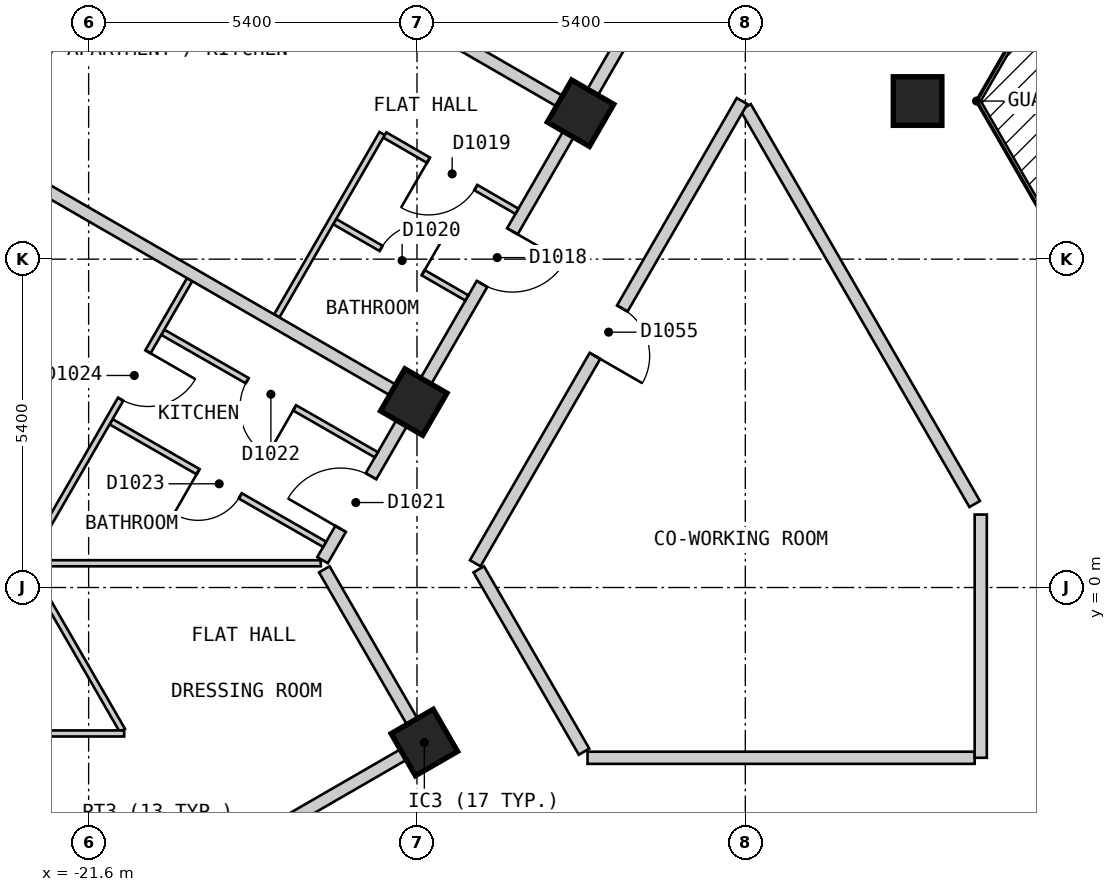
"""IFC4 building model, lengths in metres.
Left out: names, types, materials, properties, quantities, classifications, styles, units other than length and angle.
Written with IfcOpenShell. Run it as: python <this file> out.ifc"""

import sys

from ifc_helpers import new_model, si_unit, direction, frame, frame_2d, origin, origin_2d, place, context, subcontext, project, spatial, polyline, rectangle, outline, extrude, element, fill, save


model = new_model("IFC4")
c1 = context("Model", 3, precision=1e-05, world=origin(), true_north=direction((0.0, 1.0)))
c2 = subcontext(c1, "Body", "Model", "MODEL_VIEW")
j1 = project(units=[si_unit("LENGTHUNIT", "METRE"), si_unit("PLANEANGLEUNIT", "RADIAN")], contexts=[c1])
p1 = place(None, origin())
s1 = spatial("IfcSite", under=j1, at=p1, CompositionType="ELEMENT")
p2 = place(p1, origin())
s2 = spatial("IfcBuilding", under=s1, at=p2, CompositionType="ELEMENT")
p3 = place(p2, frame((0.0, 0.0, 126.6)))
s3 = spatial("IfcBuildingStorey", under=s2, at=p3, CompositionType="ELEMENT", Elevation=126.6)
for number, where, z_axis, x_axis in (
    (1, (-16.079, -2.549, 0.0), (0.0, 0.0, 1.0), (0.5, -0.866, 0.0)),
    (2, (-7.967, 8.0, 0.0), (0.0, 0.0, 1.0), (1.0, 0.0, 0.0)),
    (3, (-13.51, 7.8, 0.0), (0.0, 0.0, 1.0), (-0.5, -0.866, 0.0)),
    (4, (-16.253, 3.05, 0.0), (0.0, 0.0, 1.0), (-0.5, -0.866, 0.0)),
):
    element("IfcColumn", number, at=place(p3, frame(where, z_axis=z_axis, x_axis=x_axis)), inside=s3, PredefinedType="COLUMN", context=c2, shape_type="SweptSolid", body=[
        extrude(rectangle(XDim=0.8, YDim=0.8, at=origin_2d()), origin(), (0.0, 0.0, 1.0), 3.0),
    ])
p4 = place(p3, frame((-16.555, 23.025, 0.0), z_axis=(0.0, 0.0, 1.0), x_axis=(-0.500020536353, -0.866013546791, 0.0)))
e5 = element("IfcWall", 5, at=p4, inside=s3, PredefinedType="SOLIDWALL", context=c2, shape_type="SweptSolid", body=[
    extrude(outline(polyline([(0.0, -0.15), (23.325, -0.15), (23.245, 0.15), (0.08, 0.15), (0.0, -0.15)])), origin(), (0.0, 0.0, 1.0), 2.7),
])
p5 = place(p4, frame((1.314, 0.0, 0.15)))
e6 = element("IfcOpeningElement", 6, at=p5, cuts=e5, PredefinedType="OPENING", context=c2, shape_type="SweptSolid", body=[
    extrude(rectangle(XDim=1.5, YDim=2.1, at=frame_2d((0.75, 1.05))), frame((0.0, 0.16, 0.0), z_axis=(0.0, -1.0, 0.0), x_axis=(1.0, 0.0, 0.0)), (0.0, 0.0, 1.0), 0.32),
])
p6 = place(p4, frame((4.056, 0.0, 0.15)))
e7 = element("IfcOpeningElement", 7, at=p6, cuts=e5, PredefinedType="OPENING", context=c2, shape_type="SweptSolid", body=[
    extrude(rectangle(XDim=1.5, YDim=2.1, at=frame_2d((0.75, 1.05))), frame((0.0, 0.16, 0.0), z_axis=(0.0, -1.0, 0.0), x_axis=(1.0, 0.0, 0.0)), (0.0, 0.0, 1.0), 0.32),
])
p7 = place(p4, frame((6.799, 0.0, 0.15)))
e8 = element("IfcOpeningElement", 8, at=p7, cuts=e5, PredefinedType="OPENING", context=c2, shape_type="SweptSolid", body=[
    extrude(rectangle(XDim=1.5, YDim=2.1, at=frame_2d((0.75, 1.05))), frame((0.0, 0.16, 0.0), z_axis=(0.0, -1.0, 0.0), x_axis=(1.0, 0.0, 0.0)), (0.0, 0.0, 1.0), 0.32),
])
p8 = place(p4, frame((9.541, 0.0, 0.15)))
e9 = element("IfcOpeningElement", 9, at=p8, cuts=e5, PredefinedType="OPENING", context=c2, shape_type="SweptSolid", body=[
    extrude(rectangle(XDim=1.5, YDim=2.1, at=frame_2d((0.75, 1.05))), frame((0.0, 0.16, 0.0), z_axis=(0.0, -1.0, 0.0), x_axis=(1.0, 0.0, 0.0)), (0.0, 0.0, 1.0), 0.32),
])
p9 = place(p4, frame((12.285, 0.0, 0.15)))
e10 = element("IfcOpeningElement", 10, at=p9, cuts=e5, PredefinedType="OPENING", context=c2, shape_type="SweptSolid", body=[
    extrude(rectangle(XDim=1.5, YDim=2.1, at=frame_2d((0.75, 1.05))), frame((0.0, 0.16, 0.0), z_axis=(0.0, -1.0, 0.0), x_axis=(1.0, 0.0, 0.0)), (0.0, 0.0, 1.0), 0.32),
])
p10 = place(p4, frame((15.027, 0.0, 0.15)))
e11 = element("IfcOpeningElement", 11, at=p10, cuts=e5, PredefinedType="OPENING", context=c2, shape_type="SweptSolid", body=[
    extrude(rectangle(XDim=1.5, YDim=2.1, at=frame_2d((0.75, 1.05))), frame((0.0, 0.16, 0.0), z_axis=(0.0, -1.0, 0.0), x_axis=(1.0, 0.0, 0.0)), (0.0, 0.0, 1.0), 0.32),
])
p11 = place(p4, frame((17.769, 0.0, 0.15)))
e12 = element("IfcOpeningElement", 12, at=p11, cuts=e5, PredefinedType="OPENING", context=c2, shape_type="SweptSolid", body=[
    extrude(rectangle(XDim=1.5, YDim=2.1, at=frame_2d((0.75, 1.05))), frame((0.0, 0.16, 0.0), z_axis=(0.0, -1.0, 0.0), x_axis=(1.0, 0.0, 0.0)), (0.0, 0.0, 1.0), 0.32),
])
p12 = place(p4, frame((20.512, 0.0, 0.15)))
e13 = element("IfcOpeningElement", 13, at=p12, cuts=e5, PredefinedType="OPENING", context=c2, shape_type="SweptSolid", body=[
    extrude(rectangle(XDim=1.5, YDim=2.1, at=frame_2d((0.75, 1.05))), frame((0.0, 0.16, 0.0), z_axis=(0.0, -1.0, 0.0), x_axis=(1.0, 0.0, 0.0)), (0.0, 0.0, 1.0), 0.32),
])
p13 = place(p3, frame((-28.218, -2.025, 0.0), z_axis=(0.0, 0.0, 1.0), x_axis=(0.500017503135, -0.866015298109, 0.0)))
e14 = element("IfcWall", 14, at=p13, inside=s3, PredefinedType="SOLIDWALL", context=c2, shape_type="SweptSolid", body=[
    extrude(outline(polyline([(0.0, -0.15), (24.711, -0.15), (24.631, 0.15), (0.08, 0.15), (0.0, -0.15)])), origin(), (0.0, 0.0, 1.0), 2.7),
])
p14 = place(p13, frame((1.4, 0.0, 0.15)))
e15 = element("IfcOpeningElement", 15, at=p14, cuts=e14, PredefinedType="OPENING", context=c2, shape_type="SweptSolid", body=[
    extrude(rectangle(XDim=1.5, YDim=2.1, at=frame_2d((0.75, 1.05))), frame((0.0, 0.16, 0.0), z_axis=(0.0, -1.0, 0.0), x_axis=(1.0, 0.0, 0.0)), (0.0, 0.0, 1.0), 0.32),
])
p15 = place(p13, frame((4.316, 0.0, 0.15)))
e16 = element("IfcOpeningElement", 16, at=p15, cuts=e14, PredefinedType="OPENING", context=c2, shape_type="SweptSolid", body=[
    extrude(rectangle(XDim=1.5, YDim=2.1, at=frame_2d((0.75, 1.05))), frame((0.0, 0.16, 0.0), z_axis=(0.0, -1.0, 0.0), x_axis=(1.0, 0.0, 0.0)), (0.0, 0.0, 1.0), 0.32),
])
p16 = place(p13, frame((7.231, 0.0, 0.15)))
e17 = element("IfcOpeningElement", 17, at=p16, cuts=e14, PredefinedType="OPENING", context=c2, shape_type="SweptSolid", body=[
    extrude(rectangle(XDim=1.5, YDim=2.1, at=frame_2d((0.75, 1.05))), frame((0.0, 0.16, 0.0), z_axis=(0.0, -1.0, 0.0), x_axis=(1.0, 0.0, 0.0)), (0.0, 0.0, 1.0), 0.32),
])
p17 = place(p13, frame((10.147, 0.0, 0.15)))
e18 = element("IfcOpeningElement", 18, at=p17, cuts=e14, PredefinedType="OPENING", context=c2, shape_type="SweptSolid", body=[
    extrude(rectangle(XDim=1.5, YDim=2.1, at=frame_2d((0.75, 1.05))), frame((0.0, 0.16, 0.0), z_axis=(0.0, -1.0, 0.0), x_axis=(1.0, 0.0, 0.0)), (0.0, 0.0, 1.0), 0.32),
])
p18 = place(p13, frame((13.062, 0.0, 0.15)))
e19 = element("IfcOpeningElement", 19, at=p18, cuts=e14, PredefinedType="OPENING", context=c2, shape_type="SweptSolid", body=[
    extrude(rectangle(XDim=1.5, YDim=2.1, at=frame_2d((0.75, 1.05))), frame((0.0, 0.16, 0.0), z_axis=(0.0, -1.0, 0.0), x_axis=(1.0, 0.0, 0.0)), (0.0, 0.0, 1.0), 0.32),
])
p19 = place(p13, frame((15.977, 0.0, 0.15)))
e20 = element("IfcOpeningElement", 20, at=p19, cuts=e14, PredefinedType="OPENING", context=c2, shape_type="SweptSolid", body=[
    extrude(rectangle(XDim=1.5, YDim=2.1, at=frame_2d((0.75, 1.05))), frame((0.0, 0.16, 0.0), z_axis=(0.0, -1.0, 0.0), x_axis=(1.0, 0.0, 0.0)), (0.0, 0.0, 1.0), 0.32),
])
p20 = place(p13, frame((18.893, 0.0, 0.15)))
e21 = element("IfcOpeningElement", 21, at=p20, cuts=e14, PredefinedType="OPENING", context=c2, shape_type="SweptSolid", body=[
    extrude(rectangle(XDim=1.5, YDim=2.1, at=frame_2d((0.75, 1.05))), frame((0.0, 0.16, 0.0), z_axis=(0.0, -1.0, 0.0), x_axis=(1.0, 0.0, 0.0)), (0.0, 0.0, 1.0), 0.32),
])
p21 = place(p13, frame((21.809, 0.0, 0.15)))
e22 = element("IfcOpeningElement", 22, at=p21, cuts=e14, PredefinedType="OPENING", context=c2, shape_type="SweptSolid", body=[
    extrude(rectangle(XDim=1.5, YDim=2.1, at=frame_2d((0.75, 1.05))), frame((0.0, 0.16, 0.0), z_axis=(0.0, -1.0, 0.0), x_axis=(1.0, 0.0, 0.0)), (0.0, 0.0, 1.0), 0.32),
])
p22 = place(p3, frame((-10.796, 7.9, 0.0), z_axis=(0.0, 0.0, 1.0), x_axis=(0.499954271211, -0.866051803703, 0.0)))
e23 = element("IfcWall", 23, at=p22, inside=s3, PredefinedType="PARTITIONING", context=c2, shape_type="SweptSolid", body=[
    extrude(rectangle(XDim=7.536, YDim=0.2, at=frame_2d((3.768, 0.0))), origin(), (0.0, 0.0, 1.0), 2.7),
])
p23 = place(p3, frame((-15.184, 0.299, 0.0), z_axis=(0.0, 0.0, 1.0), x_axis=(0.500149577091, -0.865939028186, 0.0)))
e24 = element("IfcWall", 24, at=p23, inside=s3, PredefinedType="PARTITIONING", context=c2, shape_type="SweptSolid", body=[
    extrude(rectangle(XDim=3.463, YDim=0.2, at=frame_2d((1.732, 0.0))), origin(), (0.0, 0.0, 1.0), 2.7),
])
p24 = place(p3, frame((-17.724, 0.299, 0.0), z_axis=(0.0, 0.0, 1.0), x_axis=(0.499910220442, -0.866077231832, 0.0)))
e25 = element("IfcWall", 25, at=p24, inside=s3, PredefinedType="PARTITIONING", context=c2, shape_type="SweptSolid", body=[
    extrude(rectangle(XDim=3.189, YDim=0.2, at=frame_2d((1.594, 0.0))), origin(), (0.0, 0.0, 1.0), 2.7),
])
p25 = place(p3, frame((-13.395, -2.8, 0.0), z_axis=(0.0, 0.0, 1.0), x_axis=(1.0, 0.0, 0.0)))
e26 = element("IfcWall", 26, at=p25, inside=s3, PredefinedType="PARTITIONING", context=c2, shape_type="SweptSolid", body=[
    extrude(rectangle(XDim=6.367, YDim=0.2, at=frame_2d((3.184, 0.0))), origin(), (0.0, 0.0, 1.0), 2.7),
])
p26 = place(p3, frame((-15.242, 0.399, 0.0), z_axis=(0.0, 0.0, 1.0), x_axis=(0.499953615651, 0.866052182145, 0.0)))
e27 = element("IfcWall", 27, at=p26, inside=s3, PredefinedType="PARTITIONING", context=c2, shape_type="SweptSolid", body=[
    extrude(rectangle(XDim=8.777, YDim=0.2, at=frame_2d((4.388, 0.0))), origin(), (0.0, 0.0, 1.0), 2.7),
])
p27 = place(p26, frame((3.938, 0.0, 0.0)))
e28 = element("IfcOpeningElement", 28, at=p27, cuts=e27, PredefinedType="OPENING", context=c2, shape_type="SweptSolid", body=[
    extrude(rectangle(XDim=0.9, YDim=2.1, at=frame_2d((0.45, 1.05))), frame((0.0, 0.11, 0.0), z_axis=(0.0, -1.0, 0.0), x_axis=(1.0, 0.0, 0.0)), (0.0, 0.0, 1.0), 0.22),
])
p28 = place(p3, frame((-17.753, 0.45, 0.0), z_axis=(0.0, 0.0, 1.0), x_axis=(0.499990970252, 0.866030617049, 0.0)))
e29 = element("IfcWall", 29, at=p28, inside=s3, PredefinedType="PARTITIONING", context=c2, shape_type="SweptSolid", body=[
    extrude(rectangle(XDim=16.974, YDim=0.2, at=frame_2d((8.487, 0.0))), origin(), (0.0, 0.0, 1.0), 2.7),
])
p29 = place(p28, frame((10.73, 0.0, 0.0)))
e30 = element("IfcOpeningElement", 30, at=p29, cuts=e29, PredefinedType="OPENING", context=c2, shape_type="SweptSolid", body=[
    extrude(rectangle(XDim=1.0, YDim=2.1, at=frame_2d((0.5, 1.05))), frame((0.0, 0.11, 0.0), z_axis=(0.0, -1.0, 0.0), x_axis=(1.0, 0.0, 0.0)), (0.0, 0.0, 1.0), 0.22),
])
p30 = place(p28, frame((5.245, 0.0, 0.0)))
e31 = element("IfcOpeningElement", 31, at=p30, cuts=e29, PredefinedType="OPENING", context=c2, shape_type="SweptSolid", body=[
    extrude(rectangle(XDim=1.0, YDim=2.1, at=frame_2d((0.5, 1.05))), frame((0.0, 0.11, 0.0), z_axis=(0.0, -1.0, 0.0), x_axis=(1.0, 0.0, 0.0)), (0.0, 0.0, 1.0), 0.22),
])
p31 = place(p28, frame((0.594, 0.0, 0.0)))
e32 = element("IfcOpeningElement", 32, at=p31, cuts=e29, PredefinedType="OPENING", context=c2, shape_type="SweptSolid", body=[
    extrude(rectangle(XDim=1.0, YDim=2.1, at=frame_2d((0.5, 1.05))), frame((0.0, 0.11, 0.0), z_axis=(0.0, -1.0, 0.0), x_axis=(1.0, 0.0, 0.0)), (0.0, 0.0, 1.0), 0.22),
])
p32 = place(p3, frame((-6.928, -2.8, 0.0), z_axis=(0.0, 0.0, 1.0), x_axis=(0.0, 1.0, 0.0)))
e33 = element("IfcWall", 33, at=p32, inside=s3, PredefinedType="PARTITIONING", context=c2, shape_type="SweptSolid", body=[
    extrude(rectangle(XDim=4.0, YDim=0.2, at=frame_2d((2.0, 0.0))), origin(), (0.0, 0.0, 1.0), 2.7),
])
p33 = place(p3, frame((-22.603, 0.349, 0.0), z_axis=(0.0, 0.0, 1.0), x_axis=(0.499930403552, -0.866065581584, 0.0)))
e34 = element("IfcWall", 34, at=p33, inside=s3, PredefinedType="PARTITIONING", context=c2, shape_type="SweptSolid", body=[
    extrude(rectangle(XDim=3.117, YDim=0.1, at=frame_2d((1.558, 0.0))), origin(), (0.0, 0.0, 1.0), 2.7),
])
p34 = place(p3, frame((-17.553, 6.017, 0.0), z_axis=(0.0, 0.0, 1.0), x_axis=(0.866038211682, -0.499977815414, 0.0)))
e35 = element("IfcWall", 35, at=p34, inside=s3, PredefinedType="PARTITIONING", context=c2, shape_type="SweptSolid", body=[
    extrude(rectangle(XDim=2.51, YDim=0.1, at=frame_2d((1.255, 0.0))), origin(), (0.0, 0.0, 1.0), 2.7),
])
p35 = place(p34, frame((0.88, 0.0, 0.0)))
e36 = element("IfcOpeningElement", 36, at=p35, cuts=e35, PredefinedType="OPENING", context=c2, shape_type="SweptSolid", body=[
    extrude(rectangle(XDim=0.8, YDim=2.1, at=frame_2d((0.4, 1.05))), frame((0.0, 0.06, 0.0), z_axis=(0.0, -1.0, 0.0), x_axis=(1.0, 0.0, 0.0)), (0.0, 0.0, 1.0), 0.12),
])
p36 = place(p3, frame((-20.381, 4.198, 0.0), z_axis=(0.0, 0.0, 1.0), x_axis=(0.867459321792, -0.497508115549, 0.0)))
e37 = element("IfcWall", 37, at=p36, inside=s3, PredefinedType="PARTITIONING", context=c2, shape_type="SweptSolid", body=[
    extrude(rectangle(XDim=4.05, YDim=0.1, at=frame_2d((2.025, 0.0))), origin(), (0.0, 0.0, 1.0), 2.7),
])
p37 = place(p36, frame((1.6, 0.0, 0.0)))
e38 = element("IfcOpeningElement", 38, at=p37, cuts=e37, PredefinedType="OPENING", context=c2, shape_type="SweptSolid", body=[
    extrude(rectangle(XDim=0.9, YDim=2.1, at=frame_2d((0.45, 1.05))), frame((0.0, 0.06, 0.0), z_axis=(0.0, -1.0, 0.0), x_axis=(1.0, 0.0, 0.0)), (0.0, 0.0, 1.0), 0.12),
])
p38 = place(p3, frame((-21.231, 2.726, 0.0), z_axis=(0.0, 0.0, 1.0), x_axis=(0.867314299312, -0.497760892607, 0.0)))
e39 = element("IfcWall", 39, at=p38, inside=s3, PredefinedType="PARTITIONING", context=c2, shape_type="SweptSolid", body=[
    extrude(rectangle(XDim=4.05, YDim=0.1, at=frame_2d((2.025, 0.0))), origin(), (0.0, 0.0, 1.0), 2.7),
])
p39 = place(p38, frame((1.65, 0.0, 0.0)))
e40 = element("IfcOpeningElement", 40, at=p39, cuts=e39, PredefinedType="OPENING", context=c2, shape_type="SweptSolid", body=[
    extrude(rectangle(XDim=0.8, YDim=2.1, at=frame_2d((0.4, 1.05))), frame((0.0, 0.06, 0.0), z_axis=(0.0, -1.0, 0.0), x_axis=(1.0, 0.0, 0.0)), (0.0, 0.0, 1.0), 0.12),
])
p40 = place(p3, frame((-16.729, 7.442, 0.0), z_axis=(0.0, 0.0, 1.0), x_axis=(0.865983051302, -0.500073349477, 0.0)))
e41 = element("IfcWall", 41, at=p40, inside=s3, PredefinedType="PARTITIONING", context=c2, shape_type="SweptSolid", body=[
    extrude(rectangle(XDim=2.509, YDim=0.1, at=frame_2d((1.255, 0.0))), origin(), (0.0, 0.0, 1.0), 2.7),
])
p41 = place(p40, frame((0.829, 0.0, 0.0)))
e42 = element("IfcOpeningElement", 42, at=p41, cuts=e41, PredefinedType="OPENING", context=c2, shape_type="SweptSolid", body=[
    extrude(rectangle(XDim=0.9, YDim=2.1, at=frame_2d((0.45, 1.05))), frame((0.0, 0.06, 0.0), z_axis=(0.0, -1.0, 0.0), x_axis=(1.0, 0.0, 0.0)), (0.0, 0.0, 1.0), 0.12),
])
p42 = place(p3, frame((-22.4, -2.4, 0.0), z_axis=(0.0, 0.0, 1.0), x_axis=(1.0, 0.0, 0.0)))
e43 = element("IfcWall", 43, at=p42, inside=s3, PredefinedType="PARTITIONING", context=c2, shape_type="SweptSolid", body=[
    extrude(rectangle(XDim=1.384, YDim=0.1, at=frame_2d((0.692, 0.0))), origin(), (0.0, 0.0, 1.0), 2.7),
])
p43 = place(p3, frame((-28.048, 0.399, 0.0), z_axis=(0.0, 0.0, 1.0), x_axis=(1.0, 0.0, 0.0)))
e44 = element("IfcWall", 44, at=p43, inside=s3, PredefinedType="PARTITIONING", context=c2, shape_type="SweptSolid", body=[
    extrude(rectangle(XDim=10.266, YDim=0.1, at=frame_2d((5.133, 0.0))), origin(), (0.0, 0.0, 1.0), 2.7),
])
p44 = place(p43, frame((2.258, 0.0, 0.0)))
e45 = element("IfcOpeningElement", 45, at=p44, cuts=e44, PredefinedType="OPENING", context=c2, shape_type="SweptSolid", body=[
    extrude(rectangle(XDim=0.9, YDim=2.1, at=frame_2d((0.45, 1.05))), frame((0.0, 0.06, 0.0), z_axis=(0.0, -1.0, 0.0), x_axis=(1.0, 0.0, 0.0)), (0.0, 0.0, 1.0), 0.12),
])
p45 = place(p3, frame((-18.506, 4.466, 0.0), z_axis=(0.0, 0.0, 1.0), x_axis=(0.500027479704, 0.866009537788, 0.0)))
e46 = element("IfcWall", 46, at=p45, inside=s3, PredefinedType="PARTITIONING", context=c2, shape_type="SweptSolid", body=[
    extrude(rectangle(XDim=3.464, YDim=0.1, at=frame_2d((1.732, 0.0))), origin(), (0.0, 0.0, 1.0), 2.7),
])
p46 = place(p3, frame((-22.603, 0.449, 0.0), z_axis=(0.0, 0.0, 1.0), x_axis=(0.500022588228, 0.866012362072, 0.0)))
e47 = element("IfcWall", 47, at=p46, inside=s3, PredefinedType="PARTITIONING", context=c2, shape_type="SweptSolid", body=[
    extrude(rectangle(XDim=5.328, YDim=0.1, at=frame_2d((2.664, 0.0))), origin(), (0.0, 0.0, 1.0), 2.7),
])
p47 = place(p46, frame((3.058, 0.0, 0.0)))
e48 = element("IfcOpeningElement", 48, at=p47, cuts=e47, PredefinedType="OPENING", context=c2, shape_type="SweptSolid", body=[
    extrude(rectangle(XDim=0.9, YDim=2.1, at=frame_2d((0.45, 1.05))), frame((0.0, 0.06, 0.0), z_axis=(0.0, -1.0, 0.0), x_axis=(1.0, 0.0, 0.0)), (0.0, 0.0, 1.0), 0.12),
])
p48 = place(p3, frame((-17.956, -3.783, 0.0), z_axis=(0.0, 0.0, 1.0), x_axis=(0.964815336827, -0.2629284424, 0.0)))
e49 = element("IfcWall", 49, at=p48, inside=s3, PredefinedType="PARTITIONING", context=c2, shape_type="SweptSolid", body=[
    extrude(rectangle(XDim=2.514, YDim=0.2, at=frame_2d((1.257, 0.0))), origin(), (0.0, 0.0, 1.0), 2.7),
])
p49 = place(p3, frame((-24.999, 8.1, 0.0), z_axis=(0.0, 0.0, 1.0), x_axis=(0.866016855193, -0.500014806302, 0.0)))
e50 = element("IfcWall", 50, at=p49, inside=s3, PredefinedType="PARTITIONING", context=c2, shape_type="SweptSolid", body=[
    extrude(rectangle(XDim=10.0, YDim=0.2, at=frame_2d((5.0, 0.0))), origin(), (0.0, 0.0, 1.0), 2.7),
])
p50 = place(p3, frame((-22.257, 12.85, 0.0), z_axis=(0.0, 0.0, 1.0), x_axis=(0.866047370643, -0.499961950354, 0.0)))
e51 = element("IfcWall", 51, at=p50, inside=s3, PredefinedType="PARTITIONING", context=c2, shape_type="SweptSolid", body=[
    extrude(rectangle(XDim=10.001, YDim=0.2, at=frame_2d((5.0, 0.0))), origin(), (0.0, 0.0, 1.0), 2.7),
])
p51 = place(p3, frame((-24.826, -7.599, 0.0), z_axis=(0.0, 0.0, 1.0), x_axis=(0.86599621094, 0.500050560081, 0.0)))
e52 = element("IfcWall", 52, at=p51, inside=s3, PredefinedType="PARTITIONING", context=c2, shape_type="SweptSolid", body=[
    extrude(rectangle(XDim=10.069, YDim=0.2, at=frame_2d((5.035, 0.0))), origin(), (0.0, 0.0, 1.0), 2.7),
])
p52 = place(p30, origin())
e53 = element("IfcDoor", 53, at=p52, inside=s3, OperationType="SINGLE_SWING_RIGHT", PredefinedType="DOOR", context=c2, shape_type="SweptSolid", body=[
    extrude(rectangle(XDim=1.0, YDim=2.1, at=frame_2d((0.5, 1.05))), frame((0.0, 0.025, 0.0), z_axis=(0.0, -1.0, 0.0), x_axis=(1.0, 0.0, 0.0)), (0.0, 0.0, 1.0), 0.05),
])
fill(e31, e53)
p53 = place(p41, origin())
e54 = element("IfcDoor", 54, at=p53, inside=s3, OperationType="SINGLE_SWING_LEFT", PredefinedType="DOOR", context=c2, shape_type="SweptSolid", body=[
    extrude(rectangle(XDim=0.9, YDim=2.1, at=frame_2d((0.45, 1.05))), frame((0.0, 0.025, 0.0), z_axis=(0.0, -1.0, 0.0), x_axis=(1.0, 0.0, 0.0)), (0.0, 0.0, 1.0), 0.05),
])
fill(e42, e54)
p54 = place(p35, origin())
e55 = element("IfcDoor", 55, at=p54, inside=s3, OperationType="SINGLE_SWING_RIGHT", PredefinedType="DOOR", context=c2, shape_type="SweptSolid", body=[
    extrude(rectangle(XDim=0.8, YDim=2.1, at=frame_2d((0.4, 1.05))), frame((0.0, 0.025, 0.0), z_axis=(0.0, -1.0, 0.0), x_axis=(1.0, 0.0, 0.0)), (0.0, 0.0, 1.0), 0.05),
])
fill(e36, e55)
p55 = place(p31, origin())
e56 = element("IfcDoor", 56, at=p55, inside=s3, OperationType="SINGLE_SWING_LEFT", PredefinedType="DOOR", context=c2, shape_type="SweptSolid", body=[
    extrude(rectangle(XDim=1.0, YDim=2.1, at=frame_2d((0.5, 1.05))), frame((0.0, 0.025, 0.0), z_axis=(0.0, -1.0, 0.0), x_axis=(1.0, 0.0, 0.0)), (0.0, 0.0, 1.0), 0.05),
])
fill(e32, e56)
p56 = place(p37, origin())
e57 = element("IfcDoor", 57, at=p56, inside=s3, OperationType="SINGLE_SWING_RIGHT", PredefinedType="DOOR", context=c2, shape_type="SweptSolid", body=[
    extrude(rectangle(XDim=0.9, YDim=2.1, at=frame_2d((0.45, 1.05))), frame((0.0, 0.025, 0.0), z_axis=(0.0, -1.0, 0.0), x_axis=(1.0, 0.0, 0.0)), (0.0, 0.0, 1.0), 0.05),
])
fill(e38, e57)
p57 = place(p39, origin())
e58 = element("IfcDoor", 58, at=p57, inside=s3, OperationType="SINGLE_SWING_LEFT", PredefinedType="DOOR", context=c2, shape_type="SweptSolid", body=[
    extrude(rectangle(XDim=0.8, YDim=2.1, at=frame_2d((0.4, 1.05))), frame((0.0, 0.025, 0.0), z_axis=(0.0, -1.0, 0.0), x_axis=(1.0, 0.0, 0.0)), (0.0, 0.0, 1.0), 0.05),
])
fill(e40, e58)
p58 = place(p47, origin())
e59 = element("IfcDoor", 59, at=p58, inside=s3, OperationType="SINGLE_SWING_RIGHT", PredefinedType="DOOR", context=c2, shape_type="SweptSolid", body=[
    extrude(rectangle(XDim=0.9, YDim=2.1, at=frame_2d((0.45, 1.05))), frame((0.0, 0.025, 0.0), z_axis=(0.0, -1.0, 0.0), x_axis=(1.0, 0.0, 0.0)), (0.0, 0.0, 1.0), 0.05),
])
fill(e48, e59)
p59 = place(p27, origin())
e60 = element("IfcDoor", 60, at=p59, inside=s3, OperationType="SINGLE_SWING_LEFT", PredefinedType="DOOR", context=c2, shape_type="SweptSolid", body=[
    extrude(rectangle(XDim=0.9, YDim=2.1, at=frame_2d((0.45, 1.05))), frame((0.0, 0.025, 0.0), z_axis=(0.0, -1.0, 0.0), x_axis=(1.0, 0.0, 0.0)), (0.0, 0.0, 1.0), 0.05),
])
fill(e28, e60)
save(model, sys.argv[1])
